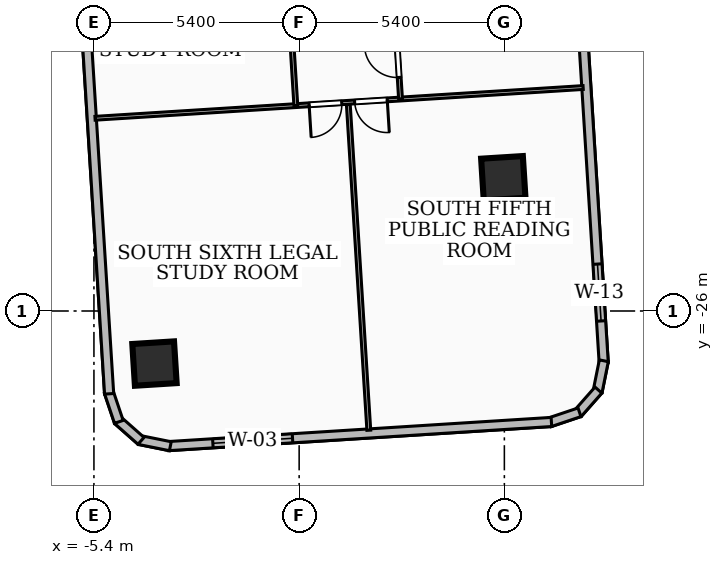
"""IFC4 building model, lengths in metres.
Left out: names, types, materials, properties, quantities, classifications, styles, units other than length and angle.
Written with IfcOpenShell. Run it as: python <this file> out.ifc"""

import sys

from ifc_helpers import new_model, si_unit, direction, frame, frame_2d, origin, origin_2d, place, context, subcontext, project, spatial, rectangle, extrude, element, fill, save


model = new_model("IFC4")
c1 = context("Model", 3, precision=1e-05, world=origin(), true_north=direction((0.0, 1.0)))
c2 = subcontext(c1, "Body", "Model", "MODEL_VIEW")
j1 = project(units=[si_unit("LENGTHUNIT", "METRE"), si_unit("PLANEANGLEUNIT", "RADIAN")], contexts=[c1])
p1 = place(None, origin())
s1 = spatial("IfcSite", under=j1, at=p1, CompositionType="ELEMENT")
p2 = place(p1, origin())
s2 = spatial("IfcBuilding", under=s1, at=p2, CompositionType="ELEMENT")
p3 = place(p2, frame((0.0, 0.0, 53.28)))
s3 = spatial("IfcBuildingStorey", under=s2, at=p3, CompositionType="ELEMENT", Elevation=53.28)
for number, where, z_axis, x_axis in (
    (1, (-3.807, -27.383, 0.0), (0.0, 0.0, 1.0), (0.998, 0.063, 0.0)),
    (2, (5.372, -22.507, 0.0), (0.0, 0.0, 1.0), (0.998, 0.063, 0.0)),
):
    element("IfcColumn", number, at=place(p3, frame(where, z_axis=z_axis, x_axis=x_axis)), inside=s3, PredefinedType="COLUMN", context=c2, shape_type="SweptSolid", body=[
        extrude(rectangle(XDim=1.1, YDim=1.1, at=origin_2d()), origin(), (0.0, 0.0, 1.0), 3.6),
    ])
p4 = place(p3, frame((7.167, -13.911, 0.0), z_axis=(0.0, 0.0, 1.0), x_axis=(0.062847485521, -0.9980231428, 0.0)))
e3 = element("IfcWall", 3, at=p4, inside=s3, PredefinedType="SOLIDWALL", context=c2, shape_type="SweptSolid", body=[
    extrude(rectangle(XDim=13.476, YDim=0.24, at=frame_2d((6.738, 0.0))), origin(), (0.0, 0.0, 1.0), 3.32),
])
p5 = place(p4, frame((10.876, 0.0, 0.85)))
e4 = element("IfcOpeningElement", 4, at=p5, cuts=e3, PredefinedType="OPENING", context=c2, shape_type="SweptSolid", body=[
    extrude(rectangle(XDim=1.5, YDim=1.8, at=frame_2d((0.75, 0.9))), frame((0.0, 0.13, 0.0), z_axis=(0.0, -1.0, 0.0), x_axis=(1.0, 0.0, 0.0)), (0.0, 0.0, 1.0), 0.26),
])
p6 = place(p3, frame((8.017, -27.31, 0.0), z_axis=(0.0, 0.0, 1.0), x_axis=(-0.197358504911, -0.980331383023, 0.0)))
e5 = element("IfcWall", 5, at=p6, inside=s3, PredefinedType="SOLIDWALL", context=c2, shape_type="SweptSolid", body=[
    extrude(rectangle(XDim=0.831, YDim=0.24, at=frame_2d((0.416, 0.0))), origin(), (0.0, 0.0, 1.0), 3.32),
])
p7 = place(p3, frame((7.875, -28.081, 0.0), z_axis=(0.0, 0.0, 1.0), x_axis=(-0.661681103469, -0.749785380833, 0.0)))
e6 = element("IfcWall", 6, at=p7, inside=s3, PredefinedType="SOLIDWALL", context=c2, shape_type="SweptSolid", body=[
    extrude(rectangle(XDim=0.815, YDim=0.24, at=frame_2d((0.407, 0.0))), origin(), (0.0, 0.0, 1.0), 3.32),
])
p8 = place(p3, frame((7.377, -28.665, 0.0), z_axis=(0.0, 0.0, 1.0), x_axis=(-0.947857653451, -0.318694004956, 0.0)))
e7 = element("IfcWall", 7, at=p8, inside=s3, PredefinedType="SOLIDWALL", context=c2, shape_type="SweptSolid", body=[
    extrude(rectangle(XDim=0.831, YDim=0.24, at=frame_2d((0.416, 0.0))), origin(), (0.0, 0.0, 1.0), 3.32),
])
p9 = place(p3, frame((6.638, -28.92, 0.0), z_axis=(0.0, 0.0, 1.0), x_axis=(-0.99802074608, -0.062885534062, 0.0)))
e8 = element("IfcWall", 8, at=p9, inside=s3, PredefinedType="SOLIDWALL", context=c2, shape_type="SweptSolid", body=[
    extrude(rectangle(XDim=10.098, YDim=0.24, at=frame_2d((5.049, 0.0))), origin(), (0.0, 0.0, 1.0), 3.32),
])
p10 = place(p9, frame((6.826, 0.0, 0.85)))
e9 = element("IfcOpeningElement", 9, at=p10, cuts=e8, PredefinedType="OPENING", context=c2, shape_type="SweptSolid", body=[
    extrude(rectangle(XDim=2.1, YDim=2.0, at=frame_2d((1.05, 1.0))), frame((0.0, 0.13, 0.0), z_axis=(0.0, -1.0, 0.0), x_axis=(1.0, 0.0, 0.0)), (0.0, 0.0, 1.0), 0.26),
])
p11 = place(p3, frame((-3.39, -29.558, 0.0), z_axis=(0.0, 0.0, 1.0), x_axis=(-0.980342817353, 0.19730169909, 0.0)))
e10 = element("IfcWall", 10, at=p11, inside=s3, PredefinedType="SOLIDWALL", context=c2, shape_type="SweptSolid", body=[
    extrude(rectangle(XDim=0.832, YDim=0.24, at=frame_2d((0.416, 0.0))), origin(), (0.0, 0.0, 1.0), 3.32),
])
p12 = place(p3, frame((-4.161, -29.416, 0.0), z_axis=(0.0, 0.0, 1.0), x_axis=(-0.749322176211, 0.662205614774, 0.0)))
e11 = element("IfcWall", 11, at=p12, inside=s3, PredefinedType="SOLIDWALL", context=c2, shape_type="SweptSolid", body=[
    extrude(rectangle(XDim=0.815, YDim=0.24, at=frame_2d((0.408, 0.0))), origin(), (0.0, 0.0, 1.0), 3.32),
])
p13 = place(p3, frame((-4.745, -28.917, 0.0), z_axis=(0.0, 0.0, 1.0), x_axis=(-0.318960399163, 0.947768043229, 0.0)))
e12 = element("IfcWall", 12, at=p13, inside=s3, PredefinedType="SOLIDWALL", context=c2, shape_type="SweptSolid", body=[
    extrude(rectangle(XDim=0.831, YDim=0.24, at=frame_2d((0.415, 0.0))), origin(), (0.0, 0.0, 1.0), 3.32),
])
p14 = place(p3, frame((-5.0, -28.179, 0.0), z_axis=(0.0, 0.0, 1.0), x_axis=(-0.062848621891, 0.99802307124, 0.0)))
e13 = element("IfcWall", 13, at=p14, inside=s3, PredefinedType="SOLIDWALL", context=c2, shape_type="SweptSolid", body=[
    extrude(rectangle(XDim=13.476, YDim=0.24, at=frame_2d((6.738, 0.0))), origin(), (0.0, 0.0, 1.0), 2.401),
])
p15 = place(p3, frame((2.668, -20.423, 0.0), z_axis=(0.0, 0.0, 1.0), x_axis=(-0.062786162632, 0.998027002531, 0.0)))
e14 = element("IfcWall", 14, at=p15, inside=s3, PredefinedType="PARTITIONING", context=c2, shape_type="SweptSolid", body=[
    extrude(rectangle(XDim=6.26, YDim=0.1, at=frame_2d((3.13, 0.0))), origin(), (0.0, 0.0, 1.0), 3.32),
])
p16 = place(p15, frame((3.7, 0.0, 0.0)))
e15 = element("IfcOpeningElement", 15, at=p16, cuts=e14, PredefinedType="OPENING", context=c2, shape_type="SweptSolid", body=[
    extrude(rectangle(XDim=0.86, YDim=2.04, at=frame_2d((0.43, 1.02))), frame((0.0, 0.06, 0.0), z_axis=(0.0, -1.0, 0.0), x_axis=(1.0, 0.0, 0.0)), (0.0, 0.0, 1.0), 0.12),
])
p17 = place(p15, frame((0.57, 0.0, 0.0)))
e16 = element("IfcOpeningElement", 16, at=p17, cuts=e14, PredefinedType="OPENING", context=c2, shape_type="SweptSolid", body=[
    extrude(rectangle(XDim=0.86, YDim=2.04, at=frame_2d((0.43, 1.02))), frame((0.0, 0.06, 0.0), z_axis=(0.0, -1.0, 0.0), x_axis=(1.0, 0.0, 0.0)), (0.0, 0.0, 1.0), 0.12),
])
p18 = place(p3, frame((-0.48, -14.348, 0.0), z_axis=(0.0, 0.0, 1.0), x_axis=(0.062786162632, -0.998027002531, 0.0)))
e17 = element("IfcWall", 17, at=p18, inside=s3, PredefinedType="PARTITIONING", context=c2, shape_type="SweptSolid", body=[
    extrude(rectangle(XDim=6.26, YDim=0.1, at=frame_2d((3.13, 0.0))), origin(), (0.0, 0.0, 1.0), 3.32),
])
p19 = place(p18, frame((0.57, 0.0, 0.0)))
e18 = element("IfcOpeningElement", 18, at=p19, cuts=e17, PredefinedType="OPENING", context=c2, shape_type="SweptSolid", body=[
    extrude(rectangle(XDim=0.86, YDim=2.04, at=frame_2d((0.43, 1.02))), frame((0.0, 0.06, 0.0), z_axis=(0.0, -1.0, 0.0), x_axis=(1.0, 0.0, 0.0)), (0.0, 0.0, 1.0), 0.12),
])
p20 = place(p18, frame((3.7, 0.0, 0.0)))
e19 = element("IfcOpeningElement", 19, at=p20, cuts=e17, PredefinedType="OPENING", context=c2, shape_type="SweptSolid", body=[
    extrude(rectangle(XDim=0.86, YDim=2.04, at=frame_2d((0.43, 1.02))), frame((0.0, 0.06, 0.0), z_axis=(0.0, -1.0, 0.0), x_axis=(1.0, 0.0, 0.0)), (0.0, 0.0, 1.0), 0.12),
])
p21 = place(p3, frame((1.294, -20.569, 0.0), z_axis=(0.0, 0.0, 1.0), x_axis=(0.062792577945, -0.998026598922, 0.0)))
e20 = element("IfcWall", 20, at=p21, inside=s3, PredefinedType="PARTITIONING", context=c2, shape_type="SweptSolid", body=[
    extrude(rectangle(XDim=8.585, YDim=0.1, at=frame_2d((4.292, 0.0))), origin(), (0.0, 0.0, 1.0), 2.812),
])
p22 = place(p3, frame((7.473, -20.12, 0.0), z_axis=(0.0, 0.0, 1.0), x_axis=(-0.998023014861, -0.062849517159, 0.0)))
e21 = element("IfcWall", 21, at=p22, inside=s3, PredefinedType="PARTITIONING", context=c2, shape_type="SweptSolid", body=[
    extrude(rectangle(XDim=12.869, YDim=0.1, at=frame_2d((6.435, 0.0))), origin(), (0.0, 0.0, 1.0), 2.401),
])
p23 = place(p22, frame((6.365, 0.0, 0.0)))
e22 = element("IfcOpeningElement", 22, at=p23, cuts=e21, PredefinedType="OPENING", context=c2, shape_type="SweptSolid", body=[
    extrude(rectangle(XDim=0.86, YDim=2.04, at=frame_2d((0.43, 1.02))), frame((0.0, 0.06, 0.0), z_axis=(0.0, -1.0, 0.0), x_axis=(1.0, 0.0, 0.0)), (0.0, 0.0, 1.0), 0.12),
])
p24 = place(p22, frame((5.165, 0.0, 0.0)))
e23 = element("IfcOpeningElement", 23, at=p24, cuts=e21, PredefinedType="OPENING", context=c2, shape_type="SweptSolid", body=[
    extrude(rectangle(XDim=0.86, YDim=2.04, at=frame_2d((0.43, 1.02))), frame((0.0, 0.06, 0.0), z_axis=(0.0, -1.0, 0.0), x_axis=(1.0, 0.0, 0.0)), (0.0, 0.0, 1.0), 0.12),
])
p25 = place(p5, origin())
e24 = element("IfcWindow", 24, at=p25, inside=s3, PartitioningType="SINGLE_PANEL", PredefinedType="WINDOW", context=c2, shape_type="SweptSolid", body=[
    extrude(rectangle(XDim=1.5, YDim=1.8, at=frame_2d((0.75, 0.9))), frame((0.0, 0.03, 0.0), z_axis=(0.0, -1.0, 0.0), x_axis=(1.0, 0.0, 0.0)), (0.0, 0.0, 1.0), 0.06),
])
fill(e4, e24)
p26 = place(p10, origin())
e25 = element("IfcWindow", 25, at=p26, inside=s3, PartitioningType="SINGLE_PANEL", PredefinedType="WINDOW", context=c2, shape_type="SweptSolid", body=[
    extrude(rectangle(XDim=2.1, YDim=2.0, at=frame_2d((1.05, 1.0))), frame((0.0, 0.03, 0.0), z_axis=(0.0, -1.0, 0.0), x_axis=(1.0, 0.0, 0.0)), (0.0, 0.0, 1.0), 0.06),
])
fill(e9, e25)
p27 = place(p17, origin())
e26 = element("IfcDoor", 26, at=p27, inside=s3, OperationType="SINGLE_SWING_RIGHT", PredefinedType="DOOR", context=c2, shape_type="SweptSolid", body=[
    extrude(rectangle(XDim=0.86, YDim=2.04, at=frame_2d((0.43, 1.02))), frame((0.0, 0.025, 0.0), z_axis=(0.0, -1.0, 0.0), x_axis=(1.0, 0.0, 0.0)), (0.0, 0.0, 1.0), 0.05),
])
fill(e16, e26)
p28 = place(p23, origin())
e27 = element("IfcDoor", 27, at=p28, inside=s3, OperationType="SINGLE_SWING_RIGHT", PredefinedType="DOOR", context=c2, shape_type="SweptSolid", body=[
    extrude(rectangle(XDim=0.86, YDim=2.04, at=frame_2d((0.43, 1.02))), frame((0.0, 0.025, 0.0), z_axis=(0.0, -1.0, 0.0), x_axis=(1.0, 0.0, 0.0)), (0.0, 0.0, 1.0), 0.05),
])
fill(e22, e27)
p29 = place(p24, origin())
e28 = element("IfcDoor", 28, at=p29, inside=s3, OperationType="SINGLE_SWING_LEFT", PredefinedType="DOOR", context=c2, shape_type="SweptSolid", body=[
    extrude(rectangle(XDim=0.86, YDim=2.04, at=frame_2d((0.43, 1.02))), frame((0.0, 0.025, 0.0), z_axis=(0.0, -1.0, 0.0), x_axis=(1.0, 0.0, 0.0)), (0.0, 0.0, 1.0), 0.05),
])
fill(e23, e28)
save(model, sys.argv[1])
